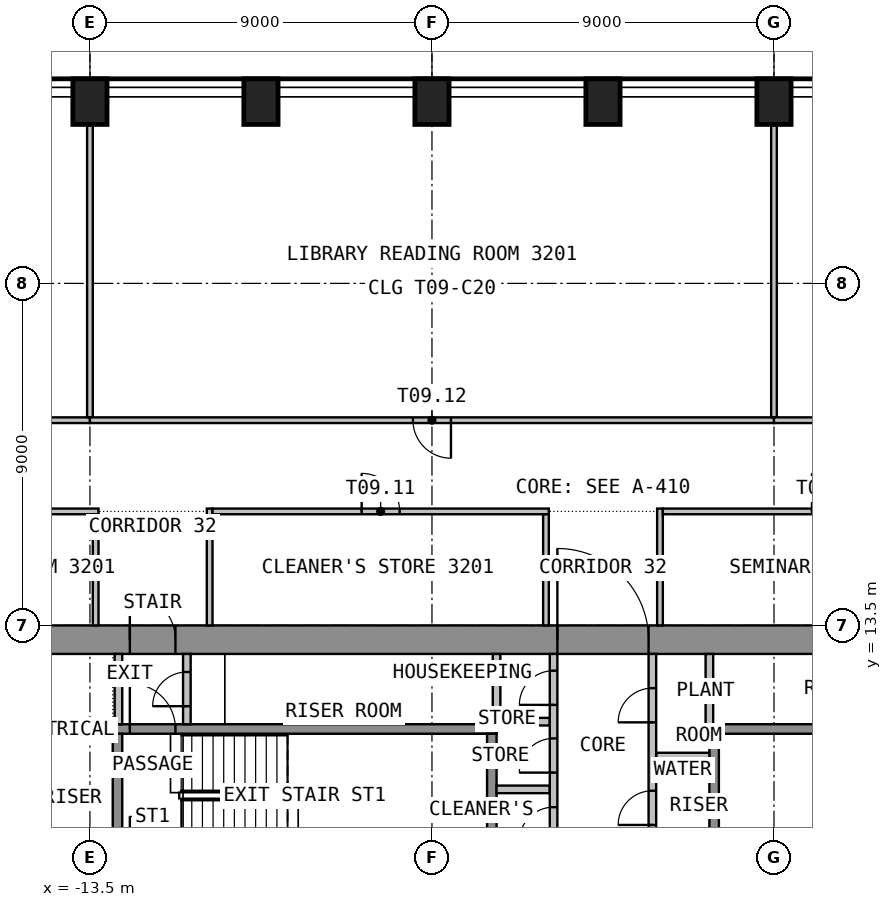
"""IFC4 building model, lengths in metres.
Left out: names, types, materials, properties, quantities, classifications, styles, units other than length and angle.
Written with IfcOpenShell. Run it as: python <this file> out.ifc"""

import sys

from ifc_helpers import new_model, si_unit, direction, frame, frame_2d, origin, origin_2d, place, context, subcontext, project, spatial, rectangle, extrude, element, fill, save


model = new_model("IFC4")
c1 = context("Model", 3, precision=1e-05, world=origin(), true_north=direction((0.0, 1.0)))
c2 = subcontext(c1, "Body", "Model", "MODEL_VIEW")
j1 = project(units=[si_unit("LENGTHUNIT", "METRE"), si_unit("PLANEANGLEUNIT", "RADIAN")], contexts=[c1])
p1 = place(None, origin())
s1 = spatial("IfcSite", under=j1, at=p1, CompositionType="ELEMENT")
p2 = place(p1, origin())
s2 = spatial("IfcBuilding", under=s1, at=p2, CompositionType="ELEMENT")
p3 = place(p2, frame((0.0, 0.0, 132.6)))
s3 = spatial("IfcBuildingStorey", under=s2, at=p3, CompositionType="ELEMENT", Elevation=132.6)
for number, where, z_axis, x_axis in (
    (1, (4.5, 27.283, 0.0), (0.0, 0.0, 1.0), (-1.0, 0.0, 0.0)),
    (2, (0.0, 27.283, 0.0), (0.0, 0.0, 1.0), (-1.0, 0.0, 0.0)),
    (3, (-4.5, 27.283, 0.0), (0.0, 0.0, 1.0), (-1.0, 0.0, 0.0)),
    (4, (-9.0, 27.283, 0.0), (0.0, 0.0, 1.0), (-1.0, 0.0, 0.0)),
    (5, (-13.5, 27.283, 0.0), (0.0, 0.0, 1.0), (-1.0, 0.0, 0.0)),
):
    element("IfcColumn", number, at=place(p3, frame(where, z_axis=z_axis, x_axis=x_axis)), inside=s3, PredefinedType="COLUMN", context=c2, shape_type="SweptSolid", body=[
        extrude(rectangle(XDim=0.9, YDim=1.2, at=origin_2d()), origin(), (0.0, 0.0, 1.0), 3.575),
    ])
p4 = place(p3, frame((-15.75, 13.125, 0.0), z_axis=(0.0, 0.0, 1.0), x_axis=(1.0, 0.0, 0.0)))
e6 = element("IfcWall", 6, at=p4, inside=s3, PredefinedType="SHEAR", context=c2, shape_type="SweptSolid", body=[
    extrude(rectangle(XDim=31.5, YDim=0.75, at=frame_2d((15.75, 0.0))), origin(), (0.0, 0.0, 1.0), 3.575),
])
p5 = place(p4, frame((14.55, 0.0, 0.0)))
e7 = element("IfcOpeningElement", 7, at=p5, cuts=e6, PredefinedType="OPENING", context=c2, shape_type="SweptSolid", body=[
    extrude(rectangle(XDim=2.4, YDim=2.1, at=frame_2d((1.2, 1.05))), frame((0.0, 0.385, 0.0), z_axis=(0.0, -1.0, 0.0), x_axis=(1.0, 0.0, 0.0)), (0.0, 0.0, 1.0), 0.77),
])
p6 = place(p4, frame((3.3, 0.0, 0.0)))
e8 = element("IfcOpeningElement", 8, at=p6, cuts=e6, PredefinedType="OPENING", context=c2, shape_type="SweptSolid", body=[
    extrude(rectangle(XDim=1.2, YDim=2.1, at=frame_2d((0.6, 1.05))), frame((0.0, 0.385, 0.0), z_axis=(0.0, -1.0, 0.0), x_axis=(1.0, 0.0, 0.0)), (0.0, 0.0, 1.0), 0.77),
])
p7 = place(p4, frame((27.0, 0.0, 0.0)))
e9 = element("IfcOpeningElement", 9, at=p7, cuts=e6, PredefinedType="OPENING", context=c2, shape_type="SweptSolid", body=[
    extrude(rectangle(XDim=1.2, YDim=2.1, at=frame_2d((0.6, 1.05))), frame((0.0, 0.385, 0.0), z_axis=(0.0, -1.0, 0.0), x_axis=(1.0, 0.0, 0.0)), (0.0, 0.0, 1.0), 0.77),
])
p8 = place(p3, frame((-12.9, 10.775, 0.0), z_axis=(0.0, 0.0, 1.0), x_axis=(1.0, 0.0, 0.0)))
e10 = element("IfcWall", 10, at=p8, inside=s3, PredefinedType="SHEAR", context=c2, shape_type="SweptSolid", body=[
    extrude(rectangle(XDim=10.1, YDim=0.25, at=frame_2d((5.05, 0.0))), origin(), (0.0, 0.0, 1.0), 3.575),
])
p9 = place(p8, frame((0.45, 0.0, 0.0)))
e11 = element("IfcOpeningElement", 11, at=p9, cuts=e10, PredefinedType="OPENING", context=c2, shape_type="SweptSolid", body=[
    extrude(rectangle(XDim=1.2, YDim=2.1, at=frame_2d((0.6, 1.05))), frame((0.0, 0.135, 0.0), z_axis=(0.0, -1.0, 0.0), x_axis=(1.0, 0.0, 0.0)), (0.0, 0.0, 1.0), 0.27),
])
for number, where, z_axis, x_axis in (
    (12, (-12.775, 7.4, 0.0), (0.0, 0.0, 1.0), (0.0, 1.0, 0.0)),
    (13, (-2.925, 7.4, 0.0), (0.0, 0.0, 1.0), (0.0, 1.0, 0.0)),
):
    element("IfcWall", number, at=place(p3, frame(where, z_axis=z_axis, x_axis=x_axis)), inside=s3, PredefinedType="SHEAR", context=c2, shape_type="SweptSolid", body=[
        extrude(rectangle(XDim=3.25, YDim=0.25, at=frame_2d((1.625, 0.0))), origin(), (0.0, 0.0, 1.0), 3.575),
    ])
p10 = place(p3, frame((2.8, 10.775, 0.0), z_axis=(0.0, 0.0, 1.0), x_axis=(1.0, 0.0, 0.0)))
e14 = element("IfcWall", 14, at=p10, inside=s3, PredefinedType="SHEAR", context=c2, shape_type="SweptSolid", body=[
    extrude(rectangle(XDim=10.1, YDim=0.25, at=frame_2d((5.05, 0.0))), origin(), (0.0, 0.0, 1.0), 3.575),
])
p11 = place(p10, frame((8.45, 0.0, 0.0)))
e15 = element("IfcOpeningElement", 15, at=p11, cuts=e14, PredefinedType="OPENING", context=c2, shape_type="SweptSolid", body=[
    extrude(rectangle(XDim=1.2, YDim=2.1, at=frame_2d((0.6, 1.05))), frame((0.0, 0.135, 0.0), z_axis=(0.0, -1.0, 0.0), x_axis=(1.0, 0.0, 0.0)), (0.0, 0.0, 1.0), 0.27),
])
p12 = place(p3, frame((2.925, 7.4, 0.0), z_axis=(0.0, 0.0, 1.0), x_axis=(0.0, 1.0, 0.0)))
e16 = element("IfcWall", 16, at=p12, inside=s3, PredefinedType="SHEAR", context=c2, shape_type="SweptSolid", body=[
    extrude(rectangle(XDim=3.25, YDim=0.25, at=frame_2d((1.625, 0.0))), origin(), (0.0, 0.0, 1.0), 3.575),
])
for number, where, z_axis, x_axis in (
    (17, (-2.8, 9.186, 0.0), (0.0, 0.0, 1.0), (1.0, 0.0, 0.0)),
    (18, (-2.8, 10.968, 0.0), (0.0, 0.0, 1.0), (1.0, 0.0, 0.0)),
    (19, (1.4, 10.05, 0.0), (0.0, 0.0, 1.0), (1.0, 0.0, 0.0)),
):
    element("IfcWall", number, at=place(p3, frame(where, z_axis=z_axis, x_axis=x_axis)), inside=s3, PredefinedType="PARTITIONING", context=c2, shape_type="SweptSolid", body=[
        extrude(rectangle(XDim=1.4, YDim=0.2, at=frame_2d((0.7, 0.0))), origin(), (0.0, 0.0, 1.0), 3.575),
    ])
p13 = place(p3, frame((-1.3, 7.15, 0.0), z_axis=(0.0, 0.0, 1.0), x_axis=(0.0, 1.0, 0.0)))
e20 = element("IfcWall", 20, at=p13, inside=s3, PredefinedType="PARTITIONING", context=c2, shape_type="SweptSolid", body=[
    extrude(rectangle(XDim=5.6, YDim=0.2, at=frame_2d((2.8, 0.0))), origin(), (0.0, 0.0, 1.0), 3.575),
])
p14 = place(p13, frame((0.668, 0.0, 0.0)))
e21 = element("IfcOpeningElement", 21, at=p14, cuts=e20, PredefinedType="OPENING", context=c2, shape_type="SweptSolid", body=[
    extrude(rectangle(XDim=0.9, YDim=2.1, at=frame_2d((0.45, 1.05))), frame((0.0, 0.11, 0.0), z_axis=(0.0, -1.0, 0.0), x_axis=(1.0, 0.0, 0.0)), (0.0, 0.0, 1.0), 0.22),
])
p15 = place(p13, frame((2.477, 0.0, 0.0)))
e22 = element("IfcOpeningElement", 22, at=p15, cuts=e20, PredefinedType="OPENING", context=c2, shape_type="SweptSolid", body=[
    extrude(rectangle(XDim=0.9, YDim=2.1, at=frame_2d((0.45, 1.05))), frame((0.0, 0.11, 0.0), z_axis=(0.0, -1.0, 0.0), x_axis=(1.0, 0.0, 0.0)), (0.0, 0.0, 1.0), 0.22),
])
p16 = place(p13, frame((4.259, 0.0, 0.0)))
e23 = element("IfcOpeningElement", 23, at=p16, cuts=e20, PredefinedType="OPENING", context=c2, shape_type="SweptSolid", body=[
    extrude(rectangle(XDim=0.9, YDim=2.1, at=frame_2d((0.45, 1.05))), frame((0.0, 0.11, 0.0), z_axis=(0.0, -1.0, 0.0), x_axis=(1.0, 0.0, 0.0)), (0.0, 0.0, 1.0), 0.22),
])
p17 = place(p3, frame((1.3, 7.15, 0.0), z_axis=(0.0, 0.0, 1.0), x_axis=(0.0, 1.0, 0.0)))
e24 = element("IfcWall", 24, at=p17, inside=s3, PredefinedType="PARTITIONING", context=c2, shape_type="SweptSolid", body=[
    extrude(rectangle(XDim=5.6, YDim=0.2, at=frame_2d((2.8, 0.0))), origin(), (0.0, 0.0, 1.0), 3.575),
])
p18 = place(p17, frame((1.1, 0.0, 0.0)))
e25 = element("IfcOpeningElement", 25, at=p18, cuts=e24, PredefinedType="OPENING", context=c2, shape_type="SweptSolid", body=[
    extrude(rectangle(XDim=0.9, YDim=2.1, at=frame_2d((0.45, 1.05))), frame((0.0, 0.11, 0.0), z_axis=(0.0, -1.0, 0.0), x_axis=(1.0, 0.0, 0.0)), (0.0, 0.0, 1.0), 0.22),
])
p19 = place(p17, frame((3.8, 0.0, 0.0)))
e26 = element("IfcOpeningElement", 26, at=p19, cuts=e24, PredefinedType="OPENING", context=c2, shape_type="SweptSolid", body=[
    extrude(rectangle(XDim=0.9, YDim=2.1, at=frame_2d((0.45, 1.05))), frame((0.0, 0.11, 0.0), z_axis=(0.0, -1.0, 0.0), x_axis=(1.0, 0.0, 0.0)), (0.0, 0.0, 1.0), 0.22),
])
p20 = place(p3, frame((-12.75, 10.9, 0.0), z_axis=(0.0, 0.0, 1.0), x_axis=(0.0, 1.0, 0.0)))
e27 = element("IfcWall", 27, at=p20, inside=s3, PredefinedType="PARTITIONING", context=c2, shape_type="SweptSolid", body=[
    extrude(rectangle(XDim=1.85, YDim=0.2, at=frame_2d((0.925, 0.0))), origin(), (0.0, 0.0, 1.0), 3.575),
])
p21 = place(p3, frame((-10.95, 10.9, 0.0), z_axis=(0.0, 0.0, 1.0), x_axis=(0.0, 1.0, 0.0)))
e28 = element("IfcWall", 28, at=p21, inside=s3, PredefinedType="PARTITIONING", context=c2, shape_type="SweptSolid", body=[
    extrude(rectangle(XDim=1.85, YDim=0.2, at=frame_2d((0.925, 0.0))), origin(), (0.0, 0.0, 1.0), 3.575),
])
p22 = place(p21, frame((0.475, 0.0, 0.0)))
e29 = element("IfcOpeningElement", 29, at=p22, cuts=e28, PredefinedType="OPENING", context=c2, shape_type="SweptSolid", body=[
    extrude(rectangle(XDim=0.9, YDim=2.1, at=frame_2d((0.45, 1.05))), frame((0.0, 0.11, 0.0), z_axis=(0.0, -1.0, 0.0), x_axis=(1.0, 0.0, 0.0)), (0.0, 0.0, 1.0), 0.22),
])
p23 = place(p3, frame((-13.5, 18.9, 0.0), z_axis=(0.0, 0.0, 1.0), x_axis=(-1.0, 0.0, 0.0)))
e30 = element("IfcWall", 30, at=p23, inside=s3, PredefinedType="PARTITIONING", context=c2, shape_type="SweptSolid", body=[
    extrude(rectangle(XDim=5.736, YDim=0.15, at=frame_2d((2.868, 0.0))), origin(), (0.0, 0.0, 1.0), 3.575),
])
p24 = place(p23, frame((2.368, 0.0, 0.0)))
e31 = element("IfcOpeningElement", 31, at=p24, cuts=e30, PredefinedType="OPENING", context=c2, shape_type="SweptSolid", body=[
    extrude(rectangle(XDim=1.0, YDim=2.1, at=frame_2d((0.5, 1.05))), frame((0.0, 0.085, 0.0), z_axis=(0.0, -1.0, 0.0), x_axis=(1.0, 0.0, 0.0)), (0.0, 0.0, 1.0), 0.17),
])
p25 = place(p3, frame((-18.675, 16.5, 0.0), z_axis=(0.0, 0.0, 1.0), x_axis=(1.0, 0.0, 0.0)))
e32 = element("IfcWall", 32, at=p25, inside=s3, PredefinedType="PARTITIONING", context=c2, shape_type="SweptSolid", body=[
    extrude(rectangle(XDim=5.4, YDim=0.15, at=frame_2d((2.7, 0.0))), origin(), (0.0, 0.0, 1.0), 3.575),
])
p26 = place(p25, frame((2.2, 0.0, 0.0)))
e33 = element("IfcOpeningElement", 33, at=p26, cuts=e32, PredefinedType="OPENING", context=c2, shape_type="SweptSolid", body=[
    extrude(rectangle(XDim=1.0, YDim=2.1, at=frame_2d((0.5, 1.05))), frame((0.0, 0.085, 0.0), z_axis=(0.0, -1.0, 0.0), x_axis=(1.0, 0.0, 0.0)), (0.0, 0.0, 1.0), 0.17),
])
p27 = place(p3, frame((-13.5, 26.663, 0.0), z_axis=(0.0, 0.0, 1.0), x_axis=(0.0, -1.0, 0.0)))
e34 = element("IfcWall", 34, at=p27, inside=s3, PredefinedType="PARTITIONING", context=c2, shape_type="SweptSolid", body=[
    extrude(rectangle(XDim=7.688, YDim=0.15, at=frame_2d((3.844, 0.0))), origin(), (0.0, 0.0, 1.0), 3.575),
])
p28 = place(p3, frame((4.5, 18.9, 0.0), z_axis=(0.0, 0.0, 1.0), x_axis=(-1.0, 0.0, 0.0)))
e35 = element("IfcWall", 35, at=p28, inside=s3, PredefinedType="PARTITIONING", context=c2, shape_type="SweptSolid", body=[
    extrude(rectangle(XDim=18.0, YDim=0.15, at=frame_2d((9.0, 0.0))), origin(), (0.0, 0.0, 1.0), 3.575),
])
p29 = place(p28, frame((8.5, 0.0, 0.0)))
e36 = element("IfcOpeningElement", 36, at=p29, cuts=e35, PredefinedType="OPENING", context=c2, shape_type="SweptSolid", body=[
    extrude(rectangle(XDim=1.0, YDim=2.1, at=frame_2d((0.5, 1.05))), frame((0.0, 0.085, 0.0), z_axis=(0.0, -1.0, 0.0), x_axis=(1.0, 0.0, 0.0)), (0.0, 0.0, 1.0), 0.17),
])
p30 = place(p3, frame((-13.35, 16.425, 0.0), z_axis=(0.0, 0.0, 1.0), x_axis=(0.0, -1.0, 0.0)))
e37 = element("IfcWall", 37, at=p30, inside=s3, PredefinedType="PARTITIONING", context=c2, shape_type="SweptSolid", body=[
    extrude(rectangle(XDim=2.925, YDim=0.15, at=frame_2d((1.462, 0.0))), origin(), (0.0, 0.0, 1.0), 3.575),
])
p31 = place(p3, frame((-10.35, 13.5, 0.0), z_axis=(0.0, 0.0, 1.0), x_axis=(0.0, 1.0, 0.0)))
e38 = element("IfcWall", 38, at=p31, inside=s3, PredefinedType="PARTITIONING", context=c2, shape_type="SweptSolid", body=[
    extrude(rectangle(XDim=3.075, YDim=0.15, at=frame_2d((1.538, 0.0))), origin(), (0.0, 0.0, 1.0), 3.575),
])
p32 = place(p3, frame((-10.275, 16.5, 0.0), z_axis=(0.0, 0.0, 1.0), x_axis=(1.0, 0.0, 0.0)))
e39 = element("IfcWall", 39, at=p32, inside=s3, PredefinedType="PARTITIONING", context=c2, shape_type="SweptSolid", body=[
    extrude(rectangle(XDim=8.85, YDim=0.15, at=frame_2d((4.425, 0.0))), origin(), (0.0, 0.0, 1.0), 3.575),
])
p33 = place(p32, frame((3.925, 0.0, 0.0)))
e40 = element("IfcOpeningElement", 40, at=p33, cuts=e39, PredefinedType="OPENING", context=c2, shape_type="SweptSolid", body=[
    extrude(rectangle(XDim=1.0, YDim=2.1, at=frame_2d((0.5, 1.05))), frame((0.0, 0.085, 0.0), z_axis=(0.0, -1.0, 0.0), x_axis=(1.0, 0.0, 0.0)), (0.0, 0.0, 1.0), 0.17),
])
p34 = place(p3, frame((-1.5, 16.425, 0.0), z_axis=(0.0, 0.0, 1.0), x_axis=(0.0, -1.0, 0.0)))
e41 = element("IfcWall", 41, at=p34, inside=s3, PredefinedType="PARTITIONING", context=c2, shape_type="SweptSolid", body=[
    extrude(rectangle(XDim=2.925, YDim=0.15, at=frame_2d((1.462, 0.0))), origin(), (0.0, 0.0, 1.0), 3.575),
])
p35 = place(p3, frame((1.5, 13.5, 0.0), z_axis=(0.0, 0.0, 1.0), x_axis=(0.0, 1.0, 0.0)))
e42 = element("IfcWall", 42, at=p35, inside=s3, PredefinedType="PARTITIONING", context=c2, shape_type="SweptSolid", body=[
    extrude(rectangle(XDim=3.075, YDim=0.15, at=frame_2d((1.538, 0.0))), origin(), (0.0, 0.0, 1.0), 3.575),
])
p36 = place(p3, frame((1.575, 16.5, 0.0), z_axis=(0.0, 0.0, 1.0), x_axis=(1.0, 0.0, 0.0)))
e43 = element("IfcWall", 43, at=p36, inside=s3, PredefinedType="PARTITIONING", context=c2, shape_type="SweptSolid", body=[
    extrude(rectangle(XDim=8.85, YDim=0.15, at=frame_2d((4.425, 0.0))), origin(), (0.0, 0.0, 1.0), 3.575),
])
p37 = place(p36, frame((3.925, 0.0, 0.0)))
e44 = element("IfcOpeningElement", 44, at=p37, cuts=e43, PredefinedType="OPENING", context=c2, shape_type="SweptSolid", body=[
    extrude(rectangle(XDim=1.0, YDim=2.1, at=frame_2d((0.5, 1.05))), frame((0.0, 0.085, 0.0), z_axis=(0.0, -1.0, 0.0), x_axis=(1.0, 0.0, 0.0)), (0.0, 0.0, 1.0), 0.17),
])
p38 = place(p3, frame((4.5, 26.663, 0.0), z_axis=(0.0, 0.0, 1.0), x_axis=(0.0, -1.0, 0.0)))
e45 = element("IfcWall", 45, at=p38, inside=s3, PredefinedType="PARTITIONING", context=c2, shape_type="SweptSolid", body=[
    extrude(rectangle(XDim=7.688, YDim=0.15, at=frame_2d((3.844, 0.0))), origin(), (0.0, 0.0, 1.0), 3.575),
])
p39 = place(p3, frame((15.593, 18.9, 0.0), z_axis=(0.0, 0.0, 1.0), x_axis=(-1.0, 0.0, 0.0)))
e46 = element("IfcWall", 46, at=p39, inside=s3, PredefinedType="PARTITIONING", context=c2, shape_type="SweptSolid", body=[
    extrude(rectangle(XDim=11.093, YDim=0.15, at=frame_2d((5.546, 0.0))), origin(), (0.0, 0.0, 1.0), 3.575),
])
p40 = place(p39, frame((5.046, 0.0, 0.0)))
e47 = element("IfcOpeningElement", 47, at=p40, cuts=e46, PredefinedType="OPENING", context=c2, shape_type="SweptSolid", body=[
    extrude(rectangle(XDim=1.0, YDim=2.1, at=frame_2d((0.5, 1.05))), frame((0.0, 0.085, 0.0), z_axis=(0.0, -1.0, 0.0), x_axis=(1.0, 0.0, 0.0)), (0.0, 0.0, 1.0), 0.17),
])
p41 = place(p3, frame((-2.8, 11.069, 0.0), z_axis=(0.0, 0.0, 1.0), x_axis=(0.0, 1.0, 0.0)))
e48 = element("IfcWall", 48, at=p41, inside=s3, PredefinedType="PARTITIONING", context=c2, shape_type="SweptSolid", body=[
    extrude(rectangle(XDim=1.68, YDim=0.2, at=frame_2d((0.84, 0.0))), origin(), (0.0, 0.0, 1.0), 3.575),
])
p42 = place(p3, frame((2.8, 12.749, 0.0), z_axis=(0.0, 0.0, 1.0), x_axis=(0.0, -1.0, 0.0)))
e49 = element("IfcWall", 49, at=p42, inside=s3, PredefinedType="PARTITIONING", context=c2, shape_type="SweptSolid", body=[
    extrude(rectangle(XDim=1.848, YDim=0.2, at=frame_2d((0.924, 0.0))), origin(), (0.0, 0.0, 1.0), 3.575),
])
p43 = place(p5, origin())
e50 = element("IfcDoor", 50, at=p43, inside=s3, OperationType="DOUBLE_DOOR_DOUBLE_SWING", PredefinedType="DOOR", context=c2, shape_type="SweptSolid", body=[
    extrude(rectangle(XDim=2.4, YDim=2.1, at=frame_2d((1.2, 1.05))), frame((0.0, 0.025, 0.0), z_axis=(0.0, -1.0, 0.0), x_axis=(1.0, 0.0, 0.0)), (0.0, 0.0, 1.0), 0.05),
])
fill(e7, e50)
p44 = place(p6, origin())
e51 = element("IfcDoor", 51, at=p44, inside=s3, OperationType="SINGLE_SWING_RIGHT", PredefinedType="DOOR", context=c2, shape_type="SweptSolid", body=[
    extrude(rectangle(XDim=1.2, YDim=2.1, at=frame_2d((0.6, 1.05))), frame((0.0, 0.025, 0.0), z_axis=(0.0, -1.0, 0.0), x_axis=(1.0, 0.0, 0.0)), (0.0, 0.0, 1.0), 0.05),
])
fill(e8, e51)
p45 = place(p14, origin())
e52 = element("IfcDoor", 52, at=p45, inside=s3, OperationType="SINGLE_SWING_LEFT", PredefinedType="DOOR", context=c2, shape_type="SweptSolid", body=[
    extrude(rectangle(XDim=0.9, YDim=2.1, at=frame_2d((0.45, 1.05))), frame((0.0, 0.025, 0.0), z_axis=(0.0, -1.0, 0.0), x_axis=(1.0, 0.0, 0.0)), (0.0, 0.0, 1.0), 0.05),
])
fill(e21, e52)
p46 = place(p15, origin())
e53 = element("IfcDoor", 53, at=p46, inside=s3, OperationType="SINGLE_SWING_LEFT", PredefinedType="DOOR", context=c2, shape_type="SweptSolid", body=[
    extrude(rectangle(XDim=0.9, YDim=2.1, at=frame_2d((0.45, 1.05))), frame((0.0, 0.025, 0.0), z_axis=(0.0, -1.0, 0.0), x_axis=(1.0, 0.0, 0.0)), (0.0, 0.0, 1.0), 0.05),
])
fill(e22, e53)
p47 = place(p16, origin())
e54 = element("IfcDoor", 54, at=p47, inside=s3, OperationType="SINGLE_SWING_LEFT", PredefinedType="DOOR", context=c2, shape_type="SweptSolid", body=[
    extrude(rectangle(XDim=0.9, YDim=2.1, at=frame_2d((0.45, 1.05))), frame((0.0, 0.025, 0.0), z_axis=(0.0, -1.0, 0.0), x_axis=(1.0, 0.0, 0.0)), (0.0, 0.0, 1.0), 0.05),
])
fill(e23, e54)
p48 = place(p18, origin())
e55 = element("IfcDoor", 55, at=p48, inside=s3, OperationType="SINGLE_SWING_LEFT", PredefinedType="DOOR", context=c2, shape_type="SweptSolid", body=[
    extrude(rectangle(XDim=0.9, YDim=2.1, at=frame_2d((0.45, 1.05))), frame((0.0, 0.025, 0.0), z_axis=(0.0, -1.0, 0.0), x_axis=(1.0, 0.0, 0.0)), (0.0, 0.0, 1.0), 0.05),
])
fill(e25, e55)
p49 = place(p19, origin())
e56 = element("IfcDoor", 56, at=p49, inside=s3, OperationType="SINGLE_SWING_LEFT", PredefinedType="DOOR", context=c2, shape_type="SweptSolid", body=[
    extrude(rectangle(XDim=0.9, YDim=2.1, at=frame_2d((0.45, 1.05))), frame((0.0, 0.025, 0.0), z_axis=(0.0, -1.0, 0.0), x_axis=(1.0, 0.0, 0.0)), (0.0, 0.0, 1.0), 0.05),
])
fill(e26, e56)
p50 = place(p9, origin())
e57 = element("IfcDoor", 57, at=p50, inside=s3, OperationType="SINGLE_SWING_RIGHT", PredefinedType="DOOR", context=c2, shape_type="SweptSolid", body=[
    extrude(rectangle(XDim=1.2, YDim=2.1, at=frame_2d((0.6, 1.05))), frame((0.0, 0.025, 0.0), z_axis=(0.0, -1.0, 0.0), x_axis=(1.0, 0.0, 0.0)), (0.0, 0.0, 1.0), 0.05),
])
fill(e11, e57)
p51 = place(p22, origin())
e58 = element("IfcDoor", 58, at=p51, inside=s3, OperationType="SINGLE_SWING_LEFT", PredefinedType="DOOR", context=c2, shape_type="SweptSolid", body=[
    extrude(rectangle(XDim=0.9, YDim=2.1, at=frame_2d((0.45, 1.05))), frame((0.0, 0.025, 0.0), z_axis=(0.0, -1.0, 0.0), x_axis=(1.0, 0.0, 0.0)), (0.0, 0.0, 1.0), 0.05),
])
fill(e29, e58)
p52 = place(p33, origin())
e59 = element("IfcDoor", 59, at=p52, inside=s3, OperationType="SINGLE_SWING_LEFT", PredefinedType="DOOR", context=c2, shape_type="SweptSolid", body=[
    extrude(rectangle(XDim=1.0, YDim=2.1, at=frame_2d((0.5, 1.05))), frame((0.0, 0.025, 0.0), z_axis=(0.0, -1.0, 0.0), x_axis=(1.0, 0.0, 0.0)), (0.0, 0.0, 1.0), 0.05),
])
fill(e40, e59)
p53 = place(p29, origin())
e60 = element("IfcDoor", 60, at=p53, inside=s3, OperationType="SINGLE_SWING_RIGHT", PredefinedType="DOOR", context=c2, shape_type="SweptSolid", body=[
    extrude(rectangle(XDim=1.0, YDim=2.1, at=frame_2d((0.5, 1.05))), frame((0.0, 0.025, 0.0), z_axis=(0.0, -1.0, 0.0), x_axis=(1.0, 0.0, 0.0)), (0.0, 0.0, 1.0), 0.05),
])
fill(e36, e60)
save(model, sys.argv[1])
